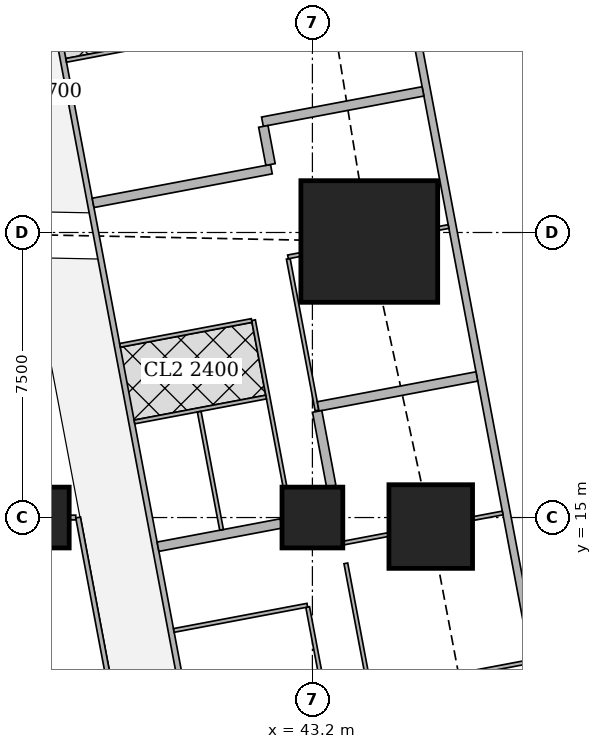
"""IFC4 building model, lengths in metres.
Left out: names, types, materials, properties, quantities, classifications, styles, units other than length and angle.
Written with IfcOpenShell. Run it as: python <this file> out.ifc"""

import sys

from ifc_helpers import new_model, si_unit, direction, frame, frame_2d, origin, origin_2d, place, context, subcontext, project, spatial, rectangle, extrude, element, fill, save


model = new_model("IFC4")
c1 = context("Model", 3, precision=1e-05, world=origin(), true_north=direction((0.0, 1.0)))
c2 = subcontext(c1, "Body", "Model", "MODEL_VIEW")
j1 = project(units=[si_unit("LENGTHUNIT", "METRE"), si_unit("PLANEANGLEUNIT", "RADIAN")], contexts=[c1])
p1 = place(None, origin())
s1 = spatial("IfcSite", under=j1, at=p1, CompositionType="ELEMENT")
p2 = place(p1, origin())
s2 = spatial("IfcBuilding", under=s1, at=p2, CompositionType="ELEMENT")
p3 = place(p2, frame((0.0, 0.0, 111.65)))
s3 = spatial("IfcBuildingStorey", under=s2, at=p3, CompositionType="ELEMENT", Elevation=111.65)
for number, where, z_axis, x_axis in (
    (1, (36.0, 15.0, 0.0), (0.0, 0.0, 1.0), (1.0, 0.0, 0.0)),
    (2, (43.2, 15.0, 0.0), (0.0, 0.0, 1.0), (1.0, 0.0, 0.0)),
):
    element("IfcColumn", number, at=place(p3, frame(where, z_axis=z_axis, x_axis=x_axis)), inside=s3, PredefinedType="COLUMN", context=c2, shape_type="SweptSolid", body=[
        extrude(rectangle(XDim=1.6, YDim=1.6, at=origin_2d()), origin(), (0.0, 0.0, 1.0), 3.75),
    ])
p4 = place(p3, frame((46.314, 14.763, 0.0), z_axis=(0.0, 0.0, 1.0), x_axis=(1.0, 0.0, 0.0)))
e3 = element("IfcColumn", 3, at=p4, inside=s3, PredefinedType="COLUMN", context=c2, shape_type="SweptSolid", body=[
    extrude(rectangle(XDim=2.2, YDim=2.2, at=origin_2d()), origin(), (0.0, 0.0, 1.0), 3.75),
])
p5 = place(p3, frame((44.697, 22.263, 0.0), z_axis=(0.0, 0.0, 1.0), x_axis=(1.0, 0.0, 0.0)))
e4 = element("IfcColumn", 4, at=p5, inside=s3, PredefinedType="COLUMN", context=c2, shape_type="SweptSolid", body=[
    extrude(rectangle(XDim=3.6, YDim=3.2, at=origin_2d()), origin(), (0.0, 0.0, 1.0), 3.75),
])
p6 = place(p3, frame((50.653, 2.703, 0.0), z_axis=(0.0, 0.0, 1.0), x_axis=(-0.185612026696, 0.982623109613, 0.0)))
e5 = element("IfcWall", 5, at=p6, inside=s3, PredefinedType="SOLIDWALL", context=c2, shape_type="SweptSolid", body=[
    extrude(rectangle(XDim=41.393, YDim=0.2, at=frame_2d((20.697, 0.0))), origin(), (0.0, 0.0, 1.0), 3.5),
])
p7 = place(p6, frame((1.633, 0.0, 0.9)))
e6 = element("IfcOpeningElement", 6, at=p7, cuts=e5, PredefinedType="OPENING", context=c2, shape_type="SweptSolid", body=[
    extrude(rectangle(XDim=1.8, YDim=1.5, at=frame_2d((0.9, 0.75))), frame((0.0, 0.11, 0.0), z_axis=(0.0, -1.0, 0.0), x_axis=(1.0, 0.0, 0.0)), (0.0, 0.0, 1.0), 0.22),
])
p8 = place(p6, frame((6.032, 0.0, 0.9)))
e7 = element("IfcOpeningElement", 7, at=p8, cuts=e5, PredefinedType="OPENING", context=c2, shape_type="SweptSolid", body=[
    extrude(rectangle(XDim=1.8, YDim=1.5, at=frame_2d((0.9, 0.75))), frame((0.0, 0.11, 0.0), z_axis=(0.0, -1.0, 0.0), x_axis=(1.0, 0.0, 0.0)), (0.0, 0.0, 1.0), 0.22),
])
p9 = place(p6, frame((9.848, 0.0, 0.9)))
e8 = element("IfcOpeningElement", 8, at=p9, cuts=e5, PredefinedType="OPENING", context=c2, shape_type="SweptSolid", body=[
    extrude(rectangle(XDim=1.8, YDim=1.5, at=frame_2d((0.9, 0.75))), frame((0.0, 0.11, 0.0), z_axis=(0.0, -1.0, 0.0), x_axis=(1.0, 0.0, 0.0)), (0.0, 0.0, 1.0), 0.22),
])
p10 = place(p6, frame((13.664, 0.0, 0.9)))
e9 = element("IfcOpeningElement", 9, at=p10, cuts=e5, PredefinedType="OPENING", context=c2, shape_type="SweptSolid", body=[
    extrude(rectangle(XDim=1.8, YDim=1.5, at=frame_2d((0.9, 0.75))), frame((0.0, 0.11, 0.0), z_axis=(0.0, -1.0, 0.0), x_axis=(1.0, 0.0, 0.0)), (0.0, 0.0, 1.0), 0.22),
])
p11 = place(p6, frame((17.481, 0.0, 0.9)))
e10 = element("IfcOpeningElement", 10, at=p11, cuts=e5, PredefinedType="OPENING", context=c2, shape_type="SweptSolid", body=[
    extrude(rectangle(XDim=1.8, YDim=1.5, at=frame_2d((0.9, 0.75))), frame((0.0, 0.11, 0.0), z_axis=(0.0, -1.0, 0.0), x_axis=(1.0, 0.0, 0.0)), (0.0, 0.0, 1.0), 0.22),
])
p12 = place(p6, frame((21.297, 0.0, 0.9)))
e11 = element("IfcOpeningElement", 11, at=p12, cuts=e5, PredefinedType="OPENING", context=c2, shape_type="SweptSolid", body=[
    extrude(rectangle(XDim=1.8, YDim=1.5, at=frame_2d((0.9, 0.75))), frame((0.0, 0.11, 0.0), z_axis=(0.0, -1.0, 0.0), x_axis=(1.0, 0.0, 0.0)), (0.0, 0.0, 1.0), 0.22),
])
p13 = place(p6, frame((25.113, 0.0, 0.9)))
e12 = element("IfcOpeningElement", 12, at=p13, cuts=e5, PredefinedType="OPENING", context=c2, shape_type="SweptSolid", body=[
    extrude(rectangle(XDim=1.8, YDim=1.5, at=frame_2d((0.9, 0.75))), frame((0.0, 0.11, 0.0), z_axis=(0.0, -1.0, 0.0), x_axis=(1.0, 0.0, 0.0)), (0.0, 0.0, 1.0), 0.22),
])
p14 = place(p6, frame((28.93, 0.0, 0.9)))
e13 = element("IfcOpeningElement", 13, at=p14, cuts=e5, PredefinedType="OPENING", context=c2, shape_type="SweptSolid", body=[
    extrude(rectangle(XDim=1.8, YDim=1.5, at=frame_2d((0.9, 0.75))), frame((0.0, 0.11, 0.0), z_axis=(0.0, -1.0, 0.0), x_axis=(1.0, 0.0, 0.0)), (0.0, 0.0, 1.0), 0.22),
])
p15 = place(p6, frame((32.746, 0.0, 0.9)))
e14 = element("IfcOpeningElement", 14, at=p15, cuts=e5, PredefinedType="OPENING", context=c2, shape_type="SweptSolid", body=[
    extrude(rectangle(XDim=1.8, YDim=1.5, at=frame_2d((0.9, 0.75))), frame((0.0, 0.11, 0.0), z_axis=(0.0, -1.0, 0.0), x_axis=(1.0, 0.0, 0.0)), (0.0, 0.0, 1.0), 0.22),
])
p16 = place(p6, frame((36.481, 0.0, 0.9)))
e15 = element("IfcOpeningElement", 15, at=p16, cuts=e5, PredefinedType="OPENING", context=c2, shape_type="SweptSolid", body=[
    extrude(rectangle(XDim=1.8, YDim=1.5, at=frame_2d((0.9, 0.75))), frame((0.0, 0.11, 0.0), z_axis=(0.0, -1.0, 0.0), x_axis=(1.0, 0.0, 0.0)), (0.0, 0.0, 1.0), 0.22),
])
p17 = place(p3, frame((33.127, 45.65, 0.0), z_axis=(0.0, 0.0, 1.0), x_axis=(0.185598547723, -0.98262565562, 0.0)))
e16 = element("IfcWall", 16, at=p17, inside=s3, PredefinedType="SOLIDWALL", context=c2, shape_type="SweptSolid", body=[
    extrude(rectangle(XDim=47.118, YDim=0.15, at=frame_2d((23.559, 0.0))), origin(), (0.0, 0.0, 1.0), 2.2),
])
p18 = place(p17, frame((20.373, 0.0, 0.0)))
e17 = element("IfcOpeningElement", 17, at=p18, cuts=e16, PredefinedType="OPENING", context=c2, shape_type="SweptSolid", body=[
    extrude(rectangle(XDim=1.0, YDim=2.1, at=frame_2d((0.5, 1.05))), frame((0.0, 0.085, 0.0), z_axis=(0.0, -1.0, 0.0), x_axis=(1.0, 0.0, 0.0)), (0.0, 0.0, 1.0), 0.17),
])
p19 = place(p17, frame((24.188, 0.0, 0.0)))
e18 = element("IfcOpeningElement", 18, at=p19, cuts=e16, PredefinedType="OPENING", context=c2, shape_type="SweptSolid", body=[
    extrude(rectangle(XDim=1.0, YDim=2.1, at=frame_2d((0.5, 1.05))), frame((0.0, 0.085, 0.0), z_axis=(0.0, -1.0, 0.0), x_axis=(1.0, 0.0, 0.0)), (0.0, 0.0, 1.0), 0.17),
])
p20 = place(p17, frame((32.608, 0.0, 0.0)))
e19 = element("IfcOpeningElement", 19, at=p20, cuts=e16, PredefinedType="OPENING", context=c2, shape_type="SweptSolid", body=[
    extrude(rectangle(XDim=1.0, YDim=2.1, at=frame_2d((0.5, 1.05))), frame((0.0, 0.085, 0.0), z_axis=(0.0, -1.0, 0.0), x_axis=(1.0, 0.0, 0.0)), (0.0, 0.0, 1.0), 0.17),
])
p21 = place(p3, frame((40.233, 27.693, 0.0), z_axis=(0.0, 0.0, 1.0), x_axis=(-0.982598214409, -0.185743772548, 0.0)))
e20 = element("IfcWall", 20, at=p21, inside=s3, PredefinedType="PARTITIONING", context=c2, shape_type="SweptSolid", body=[
    extrude(rectangle(XDim=3.575, YDim=0.1, at=frame_2d((1.788, 0.0))), origin(), (0.0, 0.0, 1.0), 3.5),
])
p22 = place(p3, frame((42.565, 21.809, 0.0), z_axis=(0.0, 0.0, 1.0), x_axis=(0.185910488551, -0.982566684885, 0.0)))
e21 = element("IfcWall", 21, at=p22, inside=s3, PredefinedType="PARTITIONING", context=c2, shape_type="SweptSolid", body=[
    extrude(rectangle(XDim=4.062, YDim=0.1, at=frame_2d((2.031, 0.0))), origin(), (0.0, 0.0, 1.0), 2.5),
])
p23 = place(p22, frame((1.618, 0.0, 0.0)))
e22 = element("IfcOpeningElement", 22, at=p23, cuts=e21, PredefinedType="OPENING", context=c2, shape_type="SweptSolid", body=[
    extrude(rectangle(XDim=0.9, YDim=2.1, at=frame_2d((0.45, 1.05))), frame((0.0, 0.06, 0.0), z_axis=(0.0, -1.0, 0.0), x_axis=(1.0, 0.0, 0.0)), (0.0, 0.0, 1.0), 0.12),
])
p24 = place(p3, frame((41.65, 20.193, 0.0), z_axis=(0.0, 0.0, 1.0), x_axis=(0.18565316258, -0.982615338382, 0.0)))
e23 = element("IfcWall", 23, at=p24, inside=s3, PredefinedType="PARTITIONING", context=c2, shape_type="SweptSolid", body=[
    extrude(rectangle(XDim=4.461, YDim=0.1, at=frame_2d((2.23, 0.0))), origin(), (0.0, 0.0, 1.0), 3.5),
])
p25 = place(p24, frame((0.575, 0.0, 0.0)))
e24 = element("IfcOpeningElement", 24, at=p25, cuts=e23, PredefinedType="OPENING", context=c2, shape_type="SweptSolid", body=[
    extrude(rectangle(XDim=0.9, YDim=2.1, at=frame_2d((0.45, 1.05))), frame((0.0, 0.06, 0.0), z_axis=(0.0, -1.0, 0.0), x_axis=(1.0, 0.0, 0.0)), (0.0, 0.0, 1.0), 0.12),
])
p26 = place(p24, frame((3.271, 0.0, 0.0)))
e25 = element("IfcOpeningElement", 25, at=p26, cuts=e23, PredefinedType="OPENING", context=c2, shape_type="SweptSolid", body=[
    extrude(rectangle(XDim=0.9, YDim=2.1, at=frame_2d((0.45, 1.05))), frame((0.0, 0.06, 0.0), z_axis=(0.0, -1.0, 0.0), x_axis=(1.0, 0.0, 0.0)), (0.0, 0.0, 1.0), 0.12),
])
p27 = place(p3, frame((46.782, 22.657, 0.0), z_axis=(0.0, 0.0, 1.0), x_axis=(-0.982574553168, -0.185868898601, 0.0)))
e26 = element("IfcWall", 26, at=p27, inside=s3, PredefinedType="PARTITIONING", context=c2, shape_type="SweptSolid", body=[
    extrude(rectangle(XDim=0.28, YDim=0.1, at=frame_2d((0.14, 0.0))), origin(), (0.0, 0.0, 1.0), 3.5),
])
p28 = place(p3, frame((42.887, 21.921, 0.0), z_axis=(0.0, 0.0, 1.0), x_axis=(-0.982274918032, -0.187445953293, 0.0)))
e27 = element("IfcWall", 27, at=p28, inside=s3, PredefinedType="PARTITIONING", context=c2, shape_type="SweptSolid", body=[
    extrude(rectangle(XDim=0.336, YDim=0.1, at=frame_2d((0.168, 0.0))), origin(), (0.0, 0.0, 1.0), 2.5),
])
p29 = place(p3, frame((41.601, 20.184, 0.0), z_axis=(0.0, 0.0, 1.0), x_axis=(-0.982638553676, -0.185530247748, 0.0)))
e28 = element("IfcWall", 28, at=p29, inside=s3, PredefinedType="PARTITIONING", context=c2, shape_type="SweptSolid", body=[
    extrude(rectangle(XDim=3.525, YDim=0.1, at=frame_2d((1.763, 0.0))), origin(), (0.0, 0.0, 1.0), 3.5),
])
p30 = place(p3, frame((41.981, 18.17, 0.0), z_axis=(0.0, 0.0, 1.0), x_axis=(-0.982585626838, -0.185810349366, 0.0)))
e29 = element("IfcWall", 29, at=p30, inside=s3, PredefinedType="PARTITIONING", context=c2, shape_type="SweptSolid", body=[
    extrude(rectangle(XDim=3.525, YDim=0.1, at=frame_2d((1.763, 0.0))), origin(), (0.0, 0.0, 1.0), 3.5),
])
p31 = place(p3, frame((46.11, 26.213, 0.0), z_axis=(0.0, 0.0, 1.0), x_axis=(-0.982633535512, -0.185556823879, 0.0)))
e30 = element("IfcWall", 30, at=p31, inside=s3, PredefinedType="SOLIDWALL", context=c2, shape_type="SweptSolid", body=[
    extrude(rectangle(XDim=4.3, YDim=0.25, at=frame_2d((2.15, 0.0))), origin(), (0.0, 0.0, 1.0), 2.2),
])
p32 = place(p3, frame((42.121, 24.166, 0.0), z_axis=(0.0, 0.0, 1.0), x_axis=(-0.98259850169, -0.185742252804, 0.0)))
e31 = element("IfcWall", 31, at=p32, inside=s3, PredefinedType="SOLIDWALL", context=c2, shape_type="SweptSolid", body=[
    extrude(rectangle(XDim=4.775, YDim=0.25, at=frame_2d((2.388, 0.0))), origin(), (0.0, 0.0, 1.0), 3.5),
])
p33 = place(p3, frame((41.908, 25.292, 0.0), z_axis=(0.0, 0.0, 1.0), x_axis=(0.18607888991, -0.982534806879, 0.0)))
e32 = element("IfcWall", 32, at=p33, inside=s3, PredefinedType="SOLIDWALL", context=c2, shape_type="SweptSolid", body=[
    extrude(rectangle(XDim=1.021, YDim=0.25, at=frame_2d((0.51, 0.0))), origin(), (0.0, 0.0, 1.0), 3.5),
])
p34 = place(p3, frame((44.08, 13.794, 0.0), z_axis=(0.0, 0.0, 1.0), x_axis=(0.185608455357, -0.982623784212, 0.0)))
e33 = element("IfcWall", 33, at=p34, inside=s3, PredefinedType="PARTITIONING", context=c2, shape_type="SweptSolid", body=[
    extrude(rectangle(XDim=10.909, YDim=0.1, at=frame_2d((5.455, 0.0))), origin(), (0.0, 0.0, 1.0), 3.5),
])
p35 = place(p34, frame((1.094, 0.0, 0.0)))
e34 = element("IfcOpeningElement", 34, at=p35, cuts=e33, PredefinedType="OPENING", context=c2, shape_type="SweptSolid", body=[
    extrude(rectangle(XDim=0.9, YDim=2.1, at=frame_2d((0.45, 1.05))), frame((0.0, 0.06, 0.0), z_axis=(0.0, -1.0, 0.0), x_axis=(1.0, 0.0, 0.0)), (0.0, 0.0, 1.0), 0.12),
])
p36 = place(p34, frame((3.639, 0.0, 0.0)))
e35 = element("IfcOpeningElement", 35, at=p36, cuts=e33, PredefinedType="OPENING", context=c2, shape_type="SweptSolid", body=[
    extrude(rectangle(XDim=0.9, YDim=2.1, at=frame_2d((0.45, 1.05))), frame((0.0, 0.06, 0.0), z_axis=(0.0, -1.0, 0.0), x_axis=(1.0, 0.0, 0.0)), (0.0, 0.0, 1.0), 0.12),
])
p37 = place(p34, frame((8.05, 0.0, 0.0)))
e36 = element("IfcOpeningElement", 36, at=p37, cuts=e33, PredefinedType="OPENING", context=c2, shape_type="SweptSolid", body=[
    extrude(rectangle(XDim=0.9, YDim=2.1, at=frame_2d((0.45, 1.05))), frame((0.0, 0.06, 0.0), z_axis=(0.0, -1.0, 0.0), x_axis=(1.0, 0.0, 0.0)), (0.0, 0.0, 1.0), 0.12),
])
p38 = place(p3, frame((43.076, 12.644, 0.0), z_axis=(0.0, 0.0, 1.0), x_axis=(0.185705350074, -0.982605476757, 0.0)))
e37 = element("IfcWall", 37, at=p38, inside=s3, PredefinedType="PARTITIONING", context=c2, shape_type="SweptSolid", body=[
    extrude(rectangle(XDim=4.411, YDim=0.1, at=frame_2d((2.205, 0.0))), origin(), (0.0, 0.0, 1.0), 3.5),
])
p39 = place(p38, frame((0.773, 0.0, 0.0)))
e38 = element("IfcOpeningElement", 38, at=p39, cuts=e37, PredefinedType="OPENING", context=c2, shape_type="SweptSolid", body=[
    extrude(rectangle(XDim=0.9, YDim=2.1, at=frame_2d((0.45, 1.05))), frame((0.0, 0.06, 0.0), z_axis=(0.0, -1.0, 0.0), x_axis=(1.0, 0.0, 0.0)), (0.0, 0.0, 1.0), 0.12),
])
p40 = place(p3, frame((48.206, 15.12, 0.0), z_axis=(0.0, 0.0, 1.0), x_axis=(-0.982512656401, -0.186195810938, 0.0)))
e39 = element("IfcWall", 39, at=p40, inside=s3, PredefinedType="PARTITIONING", context=c2, shape_type="SweptSolid", body=[
    extrude(rectangle(XDim=0.796, YDim=0.1, at=frame_2d((0.398, 0.0))), origin(), (0.0, 0.0, 1.0), 3.5),
])
p41 = place(p3, frame((45.204, 14.553, 0.0), z_axis=(0.0, 0.0, 1.0), x_axis=(-0.982545444659, -0.186022711461, 0.0)))
e40 = element("IfcWall", 40, at=p41, inside=s3, PredefinedType="PARTITIONING", context=c2, shape_type="SweptSolid", body=[
    extrude(rectangle(XDim=1.215, YDim=0.1, at=frame_2d((0.608, 0.0))), origin(), (0.0, 0.0, 1.0), 3.5),
])
p42 = place(p3, frame((48.943, 11.213, 0.0), z_axis=(0.0, 0.0, 1.0), x_axis=(-0.982623519589, -0.185609856287, 0.0)))
e41 = element("IfcWall", 41, at=p42, inside=s3, PredefinedType="PARTITIONING", context=c2, shape_type="SweptSolid", body=[
    extrude(rectangle(XDim=4.25, YDim=0.1, at=frame_2d((2.125, 0.0))), origin(), (0.0, 0.0, 1.0), 2.2),
])
p43 = place(p3, frame((43.067, 12.693, 0.0), z_axis=(0.0, 0.0, 1.0), x_axis=(-0.982598214409, -0.185743772548, 0.0)))
e42 = element("IfcWall", 42, at=p43, inside=s3, PredefinedType="PARTITIONING", context=c2, shape_type="SweptSolid", body=[
    extrude(rectangle(XDim=3.575, YDim=0.1, at=frame_2d((1.788, 0.0))), origin(), (0.0, 0.0, 1.0), 3.5),
])
p44 = place(p3, frame((47.527, 18.712, 0.0), z_axis=(0.0, 0.0, 1.0), x_axis=(-0.982665405803, -0.185387972203, 0.0)))
e43 = element("IfcWall", 43, at=p44, inside=s3, PredefinedType="SOLIDWALL", context=c2, shape_type="SweptSolid", body=[
    extrude(rectangle(XDim=4.25, YDim=0.25, at=frame_2d((2.125, 0.0))), origin(), (0.0, 0.0, 1.0), 2.2),
])
p45 = place(p3, frame((42.376, 14.844, 0.0), z_axis=(0.0, 0.0, 1.0), x_axis=(-0.982610440948, -0.18567908159, 0.0)))
e44 = element("IfcWall", 44, at=p45, inside=s3, PredefinedType="SOLIDWALL", context=c2, shape_type="SweptSolid", body=[
    extrude(rectangle(XDim=3.296, YDim=0.25, at=frame_2d((1.648, 0.0))), origin(), (0.0, 0.0, 1.0), 3.5),
])
p46 = place(p3, frame((43.325, 17.792, 0.0), z_axis=(0.0, 0.0, 1.0), x_axis=(0.185296805985, -0.982682600686, 0.0)))
e45 = element("IfcWall", 45, at=p46, inside=s3, PredefinedType="SOLIDWALL", context=c2, shape_type="SweptSolid", body=[
    extrude(rectangle(XDim=2.003, YDim=0.25, at=frame_2d((1.001, 0.0))), origin(), (0.0, 0.0, 1.0), 3.5),
])
p47 = place(p3, frame((40.222, 17.786, 0.0), z_axis=(0.0, 0.0, 1.0), x_axis=(0.185768925106, -0.982593459405, 0.0)))
e46 = element("IfcWall", 46, at=p47, inside=s3, PredefinedType="PARTITIONING", context=c2, shape_type="SweptSolid", body=[
    extrude(rectangle(XDim=3.166, YDim=0.1, at=frame_2d((1.583, 0.0))), origin(), (0.0, 0.0, 1.0), 3.5),
])
p48 = place(p47, frame((1.17, 0.0, 0.0)))
e47 = element("IfcOpeningElement", 47, at=p48, cuts=e46, PredefinedType="OPENING", context=c2, shape_type="SweptSolid", body=[
    extrude(rectangle(XDim=0.9, YDim=2.1, at=frame_2d((0.45, 1.05))), frame((0.0, 0.06, 0.0), z_axis=(0.0, -1.0, 0.0), x_axis=(1.0, 0.0, 0.0)), (0.0, 0.0, 1.0), 0.12),
])
p49 = place(p3, frame((37.9, 10.413, 0.0), z_axis=(0.0, 0.0, 1.0), x_axis=(-0.185513629891, 0.982641691119, 0.0)))
e48 = element("IfcWall", 48, at=p49, inside=s3, PredefinedType="PARTITIONING", context=c2, shape_type="SweptSolid", body=[
    extrude(rectangle(XDim=4.668, YDim=0.125, at=frame_2d((2.334, 0.0))), origin(), (0.0, 0.0, 1.0), 3.5),
])
p50 = place(p49, frame((0.708, 0.0, 0.0)))
e49 = element("IfcOpeningElement", 49, at=p50, cuts=e48, PredefinedType="OPENING", context=c2, shape_type="SweptSolid", body=[
    extrude(rectangle(XDim=1.0, YDim=2.1, at=frame_2d((0.5, 1.05))), frame((0.0, 0.073, 0.0), z_axis=(0.0, -1.0, 0.0), x_axis=(1.0, 0.0, 0.0)), (0.0, 0.0, 1.0), 0.145),
])
p51 = place(p3, frame((36.801, 15.0, 0.0), z_axis=(0.0, 0.0, 1.0), x_axis=(1.0, 0.0, 0.0)))
e50 = element("IfcWall", 50, at=p51, inside=s3, PredefinedType="PARTITIONING", context=c2, shape_type="SweptSolid", body=[
    extrude(rectangle(XDim=0.172, YDim=0.125, at=frame_2d((0.086, 0.0))), origin(), (0.0, 0.0, 1.0), 3.5),
])
p52 = place(p9, origin())
e51 = element("IfcWindow", 51, at=p52, inside=s3, PartitioningType="SINGLE_PANEL", PredefinedType="WINDOW", context=c2, shape_type="SweptSolid", body=[
    extrude(rectangle(XDim=1.8, YDim=1.5, at=frame_2d((0.9, 0.75))), frame((0.0, 0.03, 0.0), z_axis=(0.0, -1.0, 0.0), x_axis=(1.0, 0.0, 0.0)), (0.0, 0.0, 1.0), 0.06),
])
fill(e8, e51)
p53 = place(p10, origin())
e52 = element("IfcWindow", 52, at=p53, inside=s3, PartitioningType="SINGLE_PANEL", PredefinedType="WINDOW", context=c2, shape_type="SweptSolid", body=[
    extrude(rectangle(XDim=1.8, YDim=1.5, at=frame_2d((0.9, 0.75))), frame((0.0, 0.03, 0.0), z_axis=(0.0, -1.0, 0.0), x_axis=(1.0, 0.0, 0.0)), (0.0, 0.0, 1.0), 0.06),
])
fill(e9, e52)
p54 = place(p11, origin())
e53 = element("IfcWindow", 53, at=p54, inside=s3, PartitioningType="SINGLE_PANEL", PredefinedType="WINDOW", context=c2, shape_type="SweptSolid", body=[
    extrude(rectangle(XDim=1.8, YDim=1.5, at=frame_2d((0.9, 0.75))), frame((0.0, 0.03, 0.0), z_axis=(0.0, -1.0, 0.0), x_axis=(1.0, 0.0, 0.0)), (0.0, 0.0, 1.0), 0.06),
])
fill(e10, e53)
p55 = place(p12, origin())
e54 = element("IfcWindow", 54, at=p55, inside=s3, PartitioningType="SINGLE_PANEL", PredefinedType="WINDOW", context=c2, shape_type="SweptSolid", body=[
    extrude(rectangle(XDim=1.8, YDim=1.5, at=frame_2d((0.9, 0.75))), frame((0.0, 0.03, 0.0), z_axis=(0.0, -1.0, 0.0), x_axis=(1.0, 0.0, 0.0)), (0.0, 0.0, 1.0), 0.06),
])
fill(e11, e54)
p56 = place(p18, origin())
e55 = element("IfcDoor", 55, at=p56, inside=s3, OperationType="SINGLE_SWING_LEFT", PredefinedType="DOOR", context=c2, shape_type="SweptSolid", body=[
    extrude(rectangle(XDim=1.0, YDim=2.1, at=frame_2d((0.5, 1.05))), frame((0.0, 0.025, 0.0), z_axis=(0.0, -1.0, 0.0), x_axis=(1.0, 0.0, 0.0)), (0.0, 0.0, 1.0), 0.05),
])
fill(e17, e55)
p57 = place(p23, origin())
e56 = element("IfcDoor", 56, at=p57, inside=s3, OperationType="SINGLE_SWING_RIGHT", PredefinedType="DOOR", context=c2, shape_type="SweptSolid", body=[
    extrude(rectangle(XDim=0.9, YDim=2.1, at=frame_2d((0.45, 1.05))), frame((0.0, 0.025, 0.0), z_axis=(0.0, -1.0, 0.0), x_axis=(1.0, 0.0, 0.0)), (0.0, 0.0, 1.0), 0.05),
])
fill(e22, e56)
p58 = place(p25, origin())
e57 = element("IfcDoor", 57, at=p58, inside=s3, OperationType="SINGLE_SWING_RIGHT", PredefinedType="DOOR", context=c2, shape_type="SweptSolid", body=[
    extrude(rectangle(XDim=0.9, YDim=2.1, at=frame_2d((0.45, 1.05))), frame((0.0, 0.025, 0.0), z_axis=(0.0, -1.0, 0.0), x_axis=(1.0, 0.0, 0.0)), (0.0, 0.0, 1.0), 0.05),
])
fill(e24, e57)
p59 = place(p26, origin())
e58 = element("IfcDoor", 58, at=p59, inside=s3, OperationType="SINGLE_SWING_LEFT", PredefinedType="DOOR", context=c2, shape_type="SweptSolid", body=[
    extrude(rectangle(XDim=0.9, YDim=2.1, at=frame_2d((0.45, 1.05))), frame((0.0, 0.025, 0.0), z_axis=(0.0, -1.0, 0.0), x_axis=(1.0, 0.0, 0.0)), (0.0, 0.0, 1.0), 0.05),
])
fill(e25, e58)
p60 = place(p19, origin())
e59 = element("IfcDoor", 59, at=p60, inside=s3, OperationType="SINGLE_SWING_RIGHT", PredefinedType="DOOR", context=c2, shape_type="SweptSolid", body=[
    extrude(rectangle(XDim=1.0, YDim=2.1, at=frame_2d((0.5, 1.05))), frame((0.0, 0.025, 0.0), z_axis=(0.0, -1.0, 0.0), x_axis=(1.0, 0.0, 0.0)), (0.0, 0.0, 1.0), 0.05),
])
fill(e18, e59)
p61 = place(p35, origin())
e60 = element("IfcDoor", 60, at=p61, inside=s3, OperationType="SINGLE_SWING_LEFT", PredefinedType="DOOR", context=c2, shape_type="SweptSolid", body=[
    extrude(rectangle(XDim=0.9, YDim=2.1, at=frame_2d((0.45, 1.05))), frame((0.0, 0.025, 0.0), z_axis=(0.0, -1.0, 0.0), x_axis=(1.0, 0.0, 0.0)), (0.0, 0.0, 1.0), 0.05),
])
fill(e34, e60)
p62 = place(p39, origin())
e61 = element("IfcDoor", 61, at=p62, inside=s3, OperationType="SINGLE_SWING_RIGHT", PredefinedType="DOOR", context=c2, shape_type="SweptSolid", body=[
    extrude(rectangle(XDim=0.9, YDim=2.1, at=frame_2d((0.45, 1.05))), frame((0.0, 0.025, 0.0), z_axis=(0.0, -1.0, 0.0), x_axis=(1.0, 0.0, 0.0)), (0.0, 0.0, 1.0), 0.05),
])
fill(e38, e61)
p63 = place(p20, origin())
e62 = element("IfcDoor", 62, at=p63, inside=s3, OperationType="SINGLE_SWING_LEFT", PredefinedType="DOOR", context=c2, shape_type="SweptSolid", body=[
    extrude(rectangle(XDim=1.0, YDim=2.1, at=frame_2d((0.5, 1.05))), frame((0.0, 0.025, 0.0), z_axis=(0.0, -1.0, 0.0), x_axis=(1.0, 0.0, 0.0)), (0.0, 0.0, 1.0), 0.05),
])
fill(e19, e62)
p64 = place(p48, origin())
e63 = element("IfcDoor", 63, at=p64, inside=s3, OperationType="SINGLE_SWING_LEFT", PredefinedType="DOOR", context=c2, shape_type="SweptSolid", body=[
    extrude(rectangle(XDim=0.9, YDim=2.1, at=frame_2d((0.45, 1.05))), frame((0.0, 0.025, 0.0), z_axis=(0.0, -1.0, 0.0), x_axis=(1.0, 0.0, 0.0)), (0.0, 0.0, 1.0), 0.05),
])
fill(e47, e63)
p65 = place(p50, origin())
e64 = element("IfcDoor", 64, at=p65, inside=s3, OperationType="SINGLE_SWING_LEFT", PredefinedType="DOOR", context=c2, shape_type="SweptSolid", body=[
    extrude(rectangle(XDim=1.0, YDim=2.1, at=frame_2d((0.5, 1.05))), frame((0.0, 0.025, 0.0), z_axis=(0.0, -1.0, 0.0), x_axis=(1.0, 0.0, 0.0)), (0.0, 0.0, 1.0), 0.05),
])
fill(e49, e64)
save(model, sys.argv[1])
